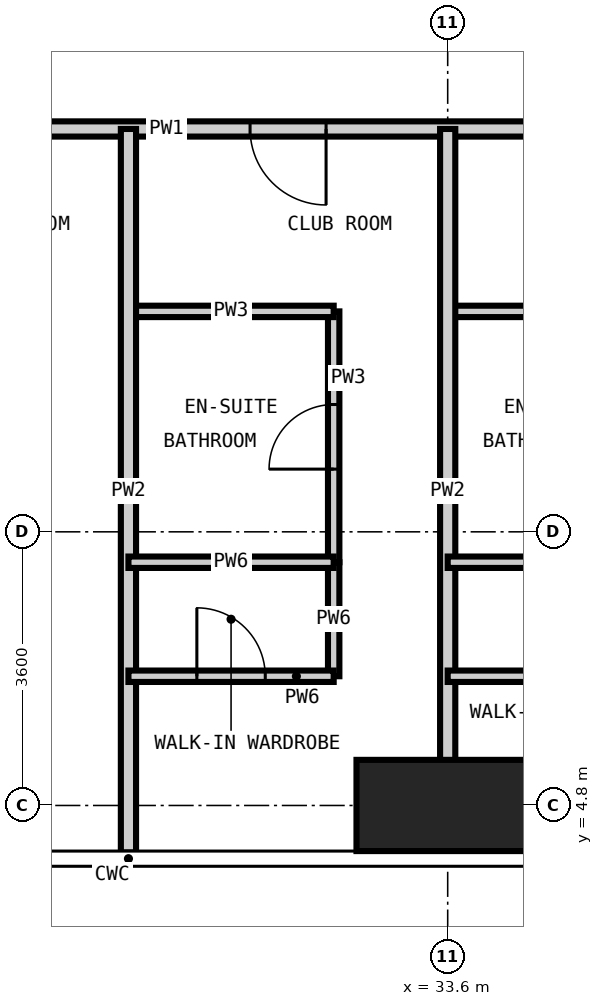
"""IFC4 building model, lengths in metres.
Left out: names, types, materials, properties, quantities, classifications, styles, units other than length and angle.
Written with IfcOpenShell. Run it as: python <this file> out.ifc"""

import sys

from ifc_helpers import new_model, si_unit, direction, frame, frame_2d, origin, origin_2d, place, context, subcontext, project, spatial, rectangle, extrude, element, fill, save


model = new_model("IFC4")
c1 = context("Model", 3, precision=1e-05, world=origin(), true_north=direction((0.0, 1.0)))
c2 = subcontext(c1, "Body", "Model", "MODEL_VIEW")
j1 = project(units=[si_unit("LENGTHUNIT", "METRE"), si_unit("PLANEANGLEUNIT", "RADIAN")], contexts=[c1])
p1 = place(None, origin())
s1 = spatial("IfcSite", under=j1, at=p1, CompositionType="ELEMENT")
p2 = place(p1, origin())
s2 = spatial("IfcBuilding", under=s1, at=p2, CompositionType="ELEMENT")
p3 = place(p2, frame((0.0, 0.0, 213.0)))
s3 = spatial("IfcBuildingStorey", under=s2, at=p3, CompositionType="ELEMENT", Elevation=213.0)
p4 = place(p3, frame((33.6, 4.8, -0.35), z_axis=(0.0, 0.0, 1.0), x_axis=(1.0, 0.0, 0.0)))
e1 = element("IfcColumn", 1, at=p4, inside=s3, PredefinedType="COLUMN", context=c2, shape_type="SweptSolid", body=[
    extrude(rectangle(XDim=2.4, YDim=1.2, at=origin_2d()), origin(), (0.0, 0.0, 1.0), 3.6),
])
p5 = place(p3, frame((32.1, 8.0, 0.0), z_axis=(0.0, 0.0, 1.0), x_axis=(0.0, 1.0, 0.0)))
e2 = element("IfcWall", 2, at=p5, inside=s3, PredefinedType="PARTITIONING", context=c2, shape_type="SweptSolid", body=[
    extrude(rectangle(XDim=3.3, YDim=0.15, at=frame_2d((1.65, 0.0))), origin(), (0.0, 0.0, 1.0), 3.25),
])
p6 = place(p5, frame((1.225, 0.0, 0.0)))
e3 = element("IfcOpeningElement", 3, at=p6, cuts=e2, PredefinedType="OPENING", context=c2, shape_type="SweptSolid", body=[
    extrude(rectangle(XDim=0.85, YDim=2.1, at=frame_2d((0.425, 1.05))), frame((0.0, 0.085, 0.0), z_axis=(0.0, -1.0, 0.0), x_axis=(1.0, 0.0, 0.0)), (0.0, 0.0, 1.0), 0.17),
])
p7 = place(p3, frame((29.4, 11.3, 0.0), z_axis=(0.0, 0.0, 1.0), x_axis=(1.0, 0.0, 0.0)))
e4 = element("IfcWall", 4, at=p7, inside=s3, PredefinedType="PARTITIONING", context=c2, shape_type="SweptSolid", body=[
    extrude(rectangle(XDim=2.7, YDim=0.15, at=frame_2d((1.35, 0.0))), origin(), (0.0, 0.0, 1.0), 3.25),
])
p8 = place(p3, frame((33.6, 11.3, 0.0), z_axis=(0.0, 0.0, 1.0), x_axis=(1.0, 0.0, 0.0)))
e5 = element("IfcWall", 5, at=p8, inside=s3, PredefinedType="PARTITIONING", context=c2, shape_type="SweptSolid", body=[
    extrude(rectangle(XDim=2.7, YDim=0.15, at=frame_2d((1.35, 0.0))), origin(), (0.0, 0.0, 1.0), 3.25),
])
p9 = place(p3, frame((45.7, 13.7, 0.0), z_axis=(0.0, 0.0, 1.0), x_axis=(-1.0, 0.0, 0.0)))
e6 = element("IfcWall", 6, at=p9, inside=s3, PredefinedType="PARTITIONING", context=c2, shape_type="SweptSolid", body=[
    extrude(rectangle(XDim=32.0, YDim=0.2, at=frame_2d((16.0, 0.0))), origin(), (0.0, 0.0, 1.0), 3.25),
])
p10 = place(p9, frame((26.3, 0.0, 0.0)))
e7 = element("IfcOpeningElement", 7, at=p10, cuts=e6, PredefinedType="OPENING", context=c2, shape_type="SweptSolid", body=[
    extrude(rectangle(XDim=1.0, YDim=2.2, at=frame_2d((0.5, 1.1))), frame((0.0, 0.11, 0.0), z_axis=(0.0, -1.0, 0.0), x_axis=(1.0, 0.0, 0.0)), (0.0, 0.0, 1.0), 0.22),
])
p11 = place(p9, frame((22.1, 0.0, 0.0)))
e8 = element("IfcOpeningElement", 8, at=p11, cuts=e6, PredefinedType="OPENING", context=c2, shape_type="SweptSolid", body=[
    extrude(rectangle(XDim=1.0, YDim=2.2, at=frame_2d((0.5, 1.1))), frame((0.0, 0.11, 0.0), z_axis=(0.0, -1.0, 0.0), x_axis=(1.0, 0.0, 0.0)), (0.0, 0.0, 1.0), 0.22),
])
p12 = place(p9, frame((17.9, 0.0, 0.0)))
e9 = element("IfcOpeningElement", 9, at=p12, cuts=e6, PredefinedType="OPENING", context=c2, shape_type="SweptSolid", body=[
    extrude(rectangle(XDim=1.0, YDim=2.2, at=frame_2d((0.5, 1.1))), frame((0.0, 0.11, 0.0), z_axis=(0.0, -1.0, 0.0), x_axis=(1.0, 0.0, 0.0)), (0.0, 0.0, 1.0), 0.22),
])
p13 = place(p9, frame((13.7, 0.0, 0.0)))
e10 = element("IfcOpeningElement", 10, at=p13, cuts=e6, PredefinedType="OPENING", context=c2, shape_type="SweptSolid", body=[
    extrude(rectangle(XDim=1.0, YDim=2.2, at=frame_2d((0.5, 1.1))), frame((0.0, 0.11, 0.0), z_axis=(0.0, -1.0, 0.0), x_axis=(1.0, 0.0, 0.0)), (0.0, 0.0, 1.0), 0.22),
])
p14 = place(p9, frame((9.5, 0.0, 0.0)))
e11 = element("IfcOpeningElement", 11, at=p14, cuts=e6, PredefinedType="OPENING", context=c2, shape_type="SweptSolid", body=[
    extrude(rectangle(XDim=1.0, YDim=2.2, at=frame_2d((0.5, 1.1))), frame((0.0, 0.11, 0.0), z_axis=(0.0, -1.0, 0.0), x_axis=(1.0, 0.0, 0.0)), (0.0, 0.0, 1.0), 0.22),
])
p15 = place(p9, frame((5.3, 0.0, 0.0)))
e12 = element("IfcOpeningElement", 12, at=p15, cuts=e6, PredefinedType="OPENING", context=c2, shape_type="SweptSolid", body=[
    extrude(rectangle(XDim=1.0, YDim=2.2, at=frame_2d((0.5, 1.1))), frame((0.0, 0.11, 0.0), z_axis=(0.0, -1.0, 0.0), x_axis=(1.0, 0.0, 0.0)), (0.0, 0.0, 1.0), 0.22),
])
for number, where, z_axis, x_axis in (
    (13, (29.4, 4.182, 0.0), (0.0, 0.0, 1.0), (0.0, 1.0, 0.0)),
    (14, (33.6, 4.182, 0.0), (0.0, 0.0, 1.0), (0.0, 1.0, 0.0)),
):
    element("IfcWall", number, at=place(p3, frame(where, z_axis=z_axis, x_axis=x_axis)), inside=s3, PredefinedType="PARTITIONING", context=c2, shape_type="SweptSolid", body=[
        extrude(rectangle(XDim=9.518, YDim=0.2, at=frame_2d((4.759, 0.0))), origin(), (0.0, 0.0, 1.0), 3.25),
    ])
p16 = place(p3, frame((32.1, 6.5, 0.0), z_axis=(0.0, 0.0, 1.0), x_axis=(0.0, 1.0, 0.0)))
e15 = element("IfcWall", 15, at=p16, inside=s3, PredefinedType="PARTITIONING", context=c2, shape_type="SweptSolid", body=[
    extrude(rectangle(XDim=1.5, YDim=0.15, at=frame_2d((0.75, 0.0))), origin(), (0.0, 0.0, 1.0), 3.25),
])
p17 = place(p3, frame((29.4, 6.5, 0.0), z_axis=(0.0, 0.0, 1.0), x_axis=(1.0, 0.0, 0.0)))
e16 = element("IfcWall", 16, at=p17, inside=s3, PredefinedType="PARTITIONING", context=c2, shape_type="SweptSolid", body=[
    extrude(rectangle(XDim=2.7, YDim=0.15, at=frame_2d((1.35, 0.0))), origin(), (0.0, 0.0, 1.0), 3.25),
])
p18 = place(p17, frame((0.9, 0.0, 0.0)))
e17 = element("IfcOpeningElement", 17, at=p18, cuts=e16, PredefinedType="OPENING", context=c2, shape_type="SweptSolid", body=[
    extrude(rectangle(XDim=0.9, YDim=2.1, at=frame_2d((0.45, 1.05))), frame((0.0, 0.085, 0.0), z_axis=(0.0, -1.0, 0.0), x_axis=(1.0, 0.0, 0.0)), (0.0, 0.0, 1.0), 0.17),
])
p19 = place(p3, frame((33.6, 6.5, 0.0), z_axis=(0.0, 0.0, 1.0), x_axis=(1.0, 0.0, 0.0)))
e18 = element("IfcWall", 18, at=p19, inside=s3, PredefinedType="PARTITIONING", context=c2, shape_type="SweptSolid", body=[
    extrude(rectangle(XDim=2.7, YDim=0.15, at=frame_2d((1.35, 0.0))), origin(), (0.0, 0.0, 1.0), 3.25),
])
p20 = place(p19, frame((1.2, 0.0, 0.0)))
e19 = element("IfcOpeningElement", 19, at=p20, cuts=e18, PredefinedType="OPENING", context=c2, shape_type="SweptSolid", body=[
    extrude(rectangle(XDim=0.9, YDim=2.1, at=frame_2d((0.45, 1.05))), frame((0.0, 0.085, 0.0), z_axis=(0.0, -1.0, 0.0), x_axis=(1.0, 0.0, 0.0)), (0.0, 0.0, 1.0), 0.17),
])
p21 = place(p3, frame((29.4, 8.0, 0.0), z_axis=(0.0, 0.0, 1.0), x_axis=(1.0, 0.0, 0.0)))
e20 = element("IfcWall", 20, at=p21, inside=s3, PredefinedType="PARTITIONING", context=c2, shape_type="SweptSolid", body=[
    extrude(rectangle(XDim=2.7, YDim=0.15, at=frame_2d((1.35, 0.0))), origin(), (0.0, 0.0, 1.0), 3.25),
])
p22 = place(p3, frame((33.6, 8.0, 0.0), z_axis=(0.0, 0.0, 1.0), x_axis=(1.0, 0.0, 0.0)))
e21 = element("IfcWall", 21, at=p22, inside=s3, PredefinedType="PARTITIONING", context=c2, shape_type="SweptSolid", body=[
    extrude(rectangle(XDim=2.7, YDim=0.15, at=frame_2d((1.35, 0.0))), origin(), (0.0, 0.0, 1.0), 3.25),
])
p23 = place(p13, origin())
e22 = element("IfcDoor", 22, at=p23, inside=s3, OperationType="SINGLE_SWING_LEFT", PredefinedType="DOOR", context=c2, shape_type="SweptSolid", body=[
    extrude(rectangle(XDim=1.0, YDim=2.2, at=frame_2d((0.5, 1.1))), frame((0.0, 0.025, 0.0), z_axis=(0.0, -1.0, 0.0), x_axis=(1.0, 0.0, 0.0)), (0.0, 0.0, 1.0), 0.05),
])
fill(e10, e22)
p24 = place(p6, origin())
e23 = element("IfcDoor", 23, at=p24, inside=s3, OperationType="SINGLE_SWING_LEFT", PredefinedType="DOOR", context=c2, shape_type="SweptSolid", body=[
    extrude(rectangle(XDim=0.85, YDim=2.1, at=frame_2d((0.425, 1.05))), frame((0.0, 0.025, 0.0), z_axis=(0.0, -1.0, 0.0), x_axis=(1.0, 0.0, 0.0)), (0.0, 0.0, 1.0), 0.05),
])
fill(e3, e23)
p25 = place(p18, origin())
e24 = element("IfcDoor", 24, at=p25, inside=s3, OperationType="SINGLE_SWING_LEFT", PredefinedType="DOOR", context=c2, shape_type="SweptSolid", body=[
    extrude(rectangle(XDim=0.9, YDim=2.1, at=frame_2d((0.45, 1.05))), frame((0.0, 0.025, 0.0), z_axis=(0.0, -1.0, 0.0), x_axis=(1.0, 0.0, 0.0)), (0.0, 0.0, 1.0), 0.05),
])
fill(e17, e24)
save(model, sys.argv[1])
